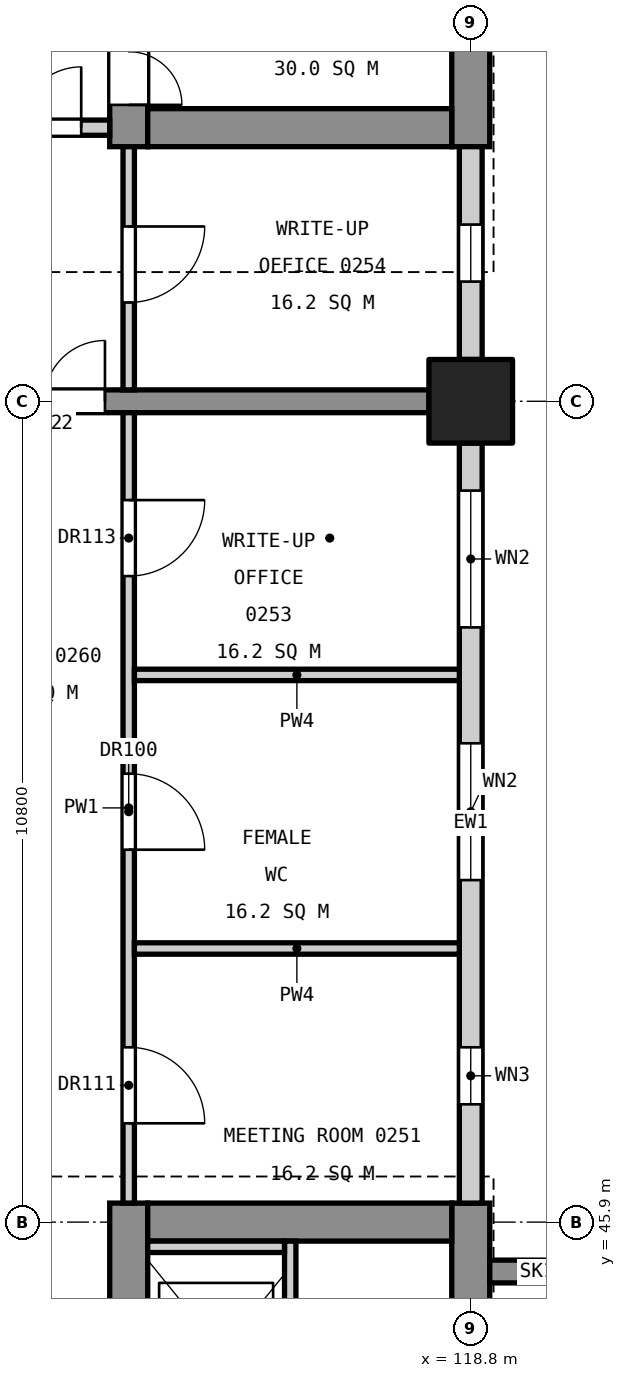
"""IFC4 building model, lengths in metres.
Left out: names, types, materials, properties, quantities, classifications, styles, units other than length and angle.
Written with IfcOpenShell. Run it as: python <this file> out.ifc"""

import sys

from ifc_helpers import new_model, si_unit, direction, frame, frame_2d, origin, origin_2d, place, context, subcontext, project, spatial, rectangle, extrude, element, fill, save


model = new_model("IFC4")
c1 = context("Model", 3, precision=1e-05, world=origin(), true_north=direction((0.0, 1.0)))
c2 = subcontext(c1, "Body", "Model", "MODEL_VIEW")
j1 = project(units=[si_unit("LENGTHUNIT", "METRE"), si_unit("PLANEANGLEUNIT", "RADIAN")], contexts=[c1])
p1 = place(None, origin())
s1 = spatial("IfcSite", under=j1, at=p1, CompositionType="ELEMENT")
p2 = place(p1, origin())
s2 = spatial("IfcBuilding", under=s1, at=p2, CompositionType="ELEMENT")
p3 = place(p2, frame((0.0, 0.0, 11.4)))
s3 = spatial("IfcBuildingStorey", under=s2, at=p3, CompositionType="ELEMENT", Elevation=11.4)
p4 = place(p3, frame((118.8, 56.7, 0.0), z_axis=(0.0, 0.0, 1.0), x_axis=(1.0, 0.0, 0.0)))
e1 = element("IfcColumn", 1, at=p4, inside=s3, PredefinedType="COLUMN", context=c2, shape_type="SweptSolid", body=[
    extrude(rectangle(XDim=1.1, YDim=1.1, at=origin_2d()), origin(), (0.0, 0.0, 1.0), 5.4),
])
p5 = place(p3, frame((118.8, 34.85, 0.0), z_axis=(0.0, 0.0, 1.0), x_axis=(0.0, 1.0, 0.0)))
e2 = element("IfcWall", 2, at=p5, inside=s3, PredefinedType="SHEAR", context=c2, shape_type="SweptSolid", body=[
    extrude(rectangle(XDim=11.3, YDim=0.5, at=frame_2d((5.65, 0.0))), origin(), (0.0, 0.0, 1.0), 5.1),
])
p6 = place(p5, frame((6.3, 0.0, 3.4)))
e3 = element("IfcOpeningElement", 3, at=p6, cuts=e2, PredefinedType="OPENING", context=c2, shape_type="SweptSolid", body=[
    extrude(rectangle(XDim=1.2, YDim=0.9, at=frame_2d((0.6, 0.45))), frame((0.0, 0.26, 0.0), z_axis=(0.0, -1.0, 0.0), x_axis=(1.0, 0.0, 0.0)), (0.0, 0.0, 1.0), 0.52),
])
p7 = place(p3, frame((114.3, 34.85, 0.0), z_axis=(0.0, 0.0, 1.0), x_axis=(0.0, 1.0, 0.0)))
e4 = element("IfcWall", 4, at=p7, inside=s3, PredefinedType="SHEAR", context=c2, shape_type="SweptSolid", body=[
    extrude(rectangle(XDim=11.3, YDim=0.5, at=frame_2d((5.65, 0.0))), origin(), (0.0, 0.0, 1.0), 5.1),
])
p8 = place(p7, frame((0.55, 0.0, 0.0)))
e5 = element("IfcOpeningElement", 5, at=p8, cuts=e4, PredefinedType="OPENING", context=c2, shape_type="SweptSolid", body=[
    extrude(rectangle(XDim=1.4, YDim=2.1, at=frame_2d((0.7, 1.05))), frame((0.0, 0.26, 0.0), z_axis=(0.0, -1.0, 0.0), x_axis=(1.0, 0.0, 0.0)), (0.0, 0.0, 1.0), 0.52),
])
p9 = place(p7, frame((8.8, 0.0, 0.0)))
e6 = element("IfcOpeningElement", 6, at=p9, cuts=e4, PredefinedType="OPENING", context=c2, shape_type="SweptSolid", body=[
    extrude(rectangle(XDim=1.1, YDim=2.1, at=frame_2d((0.55, 1.05))), frame((0.0, 0.26, 0.0), z_axis=(0.0, -1.0, 0.0), x_axis=(1.0, 0.0, 0.0)), (0.0, 0.0, 1.0), 0.52),
])
p10 = place(p3, frame((118.55, 45.9, 0.0), z_axis=(0.0, 0.0, 1.0), x_axis=(-1.0, 0.0, 0.0)))
e7 = element("IfcWall", 7, at=p10, inside=s3, PredefinedType="SHEAR", context=c2, shape_type="SweptSolid", body=[
    extrude(rectangle(XDim=4.0, YDim=0.5, at=frame_2d((2.0, 0.0))), origin(), (0.0, 0.0, 1.0), 5.1),
])
p11 = place(p3, frame((118.8, 60.05, 0.0), z_axis=(0.0, 0.0, 1.0), x_axis=(0.0, 1.0, 0.0)))
e8 = element("IfcWall", 8, at=p11, inside=s3, PredefinedType="SHEAR", context=c2, shape_type="SweptSolid", body=[
    extrude(rectangle(XDim=14.9, YDim=0.5, at=frame_2d((7.45, 0.0))), origin(), (0.0, 0.0, 1.0), 5.1),
])
p12 = place(p11, frame((6.3, 0.0, 3.4)))
e9 = element("IfcOpeningElement", 9, at=p12, cuts=e8, PredefinedType="OPENING", context=c2, shape_type="SweptSolid", body=[
    extrude(rectangle(XDim=1.2, YDim=0.9, at=frame_2d((0.6, 0.45))), frame((0.0, 0.26, 0.0), z_axis=(0.0, -1.0, 0.0), x_axis=(1.0, 0.0, 0.0)), (0.0, 0.0, 1.0), 0.52),
])
p13 = place(p3, frame((114.3, 60.05, 0.0), z_axis=(0.0, 0.0, 1.0), x_axis=(0.0, 1.0, 0.0)))
e10 = element("IfcWall", 10, at=p13, inside=s3, PredefinedType="SHEAR", context=c2, shape_type="SweptSolid", body=[
    extrude(rectangle(XDim=14.9, YDim=0.5, at=frame_2d((7.45, 0.0))), origin(), (0.0, 0.0, 1.0), 5.1),
])
p14 = place(p13, frame((0.55, 0.0, 0.0)))
e11 = element("IfcOpeningElement", 11, at=p14, cuts=e10, PredefinedType="OPENING", context=c2, shape_type="SweptSolid", body=[
    extrude(rectangle(XDim=1.4, YDim=2.1, at=frame_2d((0.7, 1.05))), frame((0.0, 0.26, 0.0), z_axis=(0.0, -1.0, 0.0), x_axis=(1.0, 0.0, 0.0)), (0.0, 0.0, 1.0), 0.52),
])
p15 = place(p13, frame((8.85, 0.0, 0.0)))
e12 = element("IfcOpeningElement", 12, at=p15, cuts=e10, PredefinedType="OPENING", context=c2, shape_type="SweptSolid", body=[
    extrude(rectangle(XDim=1.1, YDim=2.1, at=frame_2d((0.55, 1.05))), frame((0.0, 0.26, 0.0), z_axis=(0.0, -1.0, 0.0), x_axis=(1.0, 0.0, 0.0)), (0.0, 0.0, 1.0), 0.52),
])
p16 = place(p13, frame((11.4, 0.0, 0.0)))
e13 = element("IfcOpeningElement", 13, at=p16, cuts=e10, PredefinedType="OPENING", context=c2, shape_type="SweptSolid", body=[
    extrude(rectangle(XDim=1.1, YDim=2.1, at=frame_2d((0.55, 1.05))), frame((0.0, 0.26, 0.0), z_axis=(0.0, -1.0, 0.0), x_axis=(1.0, 0.0, 0.0)), (0.0, 0.0, 1.0), 0.52),
])
p17 = place(p3, frame((118.55, 60.3, 0.0), z_axis=(0.0, 0.0, 1.0), x_axis=(-1.0, 0.0, 0.0)))
e14 = element("IfcWall", 14, at=p17, inside=s3, PredefinedType="SHEAR", context=c2, shape_type="SweptSolid", body=[
    extrude(rectangle(XDim=4.0, YDim=0.5, at=frame_2d((2.0, 0.0))), origin(), (0.0, 0.0, 1.0), 5.1),
])
p18 = place(p3, frame((119.05, 45.25, 0.0), z_axis=(0.0, 0.0, 1.0), x_axis=(1.0, 0.0, 0.0)))
e15 = element("IfcWall", 15, at=p18, inside=s3, PredefinedType="SHEAR", context=c2, shape_type="SweptSolid", body=[
    extrude(rectangle(XDim=1.25, YDim=0.3, at=frame_2d((0.625, 0.0))), origin(), (0.0, 0.0, 1.0), 5.4),
])
p19 = place(p3, frame((118.25, 56.7, 0.0), z_axis=(0.0, 0.0, 1.0), x_axis=(-1.0, 0.0, 0.0)))
e16 = element("IfcWall", 16, at=p19, inside=s3, PredefinedType="SHEAR", context=c2, shape_type="SweptSolid", body=[
    extrude(rectangle(XDim=6.1, YDim=0.3, at=frame_2d((3.05, 0.0))), origin(), (0.0, 0.0, 1.0), 5.1),
])
p20 = place(p19, frame((4.262, 0.0, 0.0)))
e17 = element("IfcOpeningElement", 17, at=p20, cuts=e16, PredefinedType="OPENING", context=c2, shape_type="SweptSolid", body=[
    extrude(rectangle(XDim=1.6, YDim=2.1, at=frame_2d((0.8, 1.05))), frame((0.0, 0.16, 0.0), z_axis=(0.0, -1.0, 0.0), x_axis=(1.0, 0.0, 0.0)), (0.0, 0.0, 1.0), 0.32),
])
p21 = place(p3, frame((116.425, 43.0, 0.0), z_axis=(0.0, 0.0, 1.0), x_axis=(0.0, 1.0, 0.0)))
e18 = element("IfcWall", 18, at=p21, inside=s3, PredefinedType="SOLIDWALL", context=c2, shape_type="SweptSolid", body=[
    extrude(rectangle(XDim=2.65, YDim=0.15, at=frame_2d((1.325, 0.0))), origin(), (0.0, 0.0, 1.0), 5.4),
])
p22 = place(p3, frame((116.35, 45.575, 0.0), z_axis=(0.0, 0.0, 1.0), x_axis=(-1.0, 0.0, 0.0)))
e19 = element("IfcWall", 19, at=p22, inside=s3, PredefinedType="SOLIDWALL", context=c2, shape_type="SweptSolid", body=[
    extrude(rectangle(XDim=1.8, YDim=0.15, at=frame_2d((0.9, 0.0))), origin(), (0.0, 0.0, 1.0), 5.4),
])
p23 = place(p3, frame((118.8, 46.15, 0.0), z_axis=(0.0, 0.0, 1.0), x_axis=(0.0, 1.0, 0.0)))
e20 = element("IfcWall", 20, at=p23, inside=s3, PredefinedType="STANDARD", context=c2, shape_type="SweptSolid", body=[
    extrude(rectangle(XDim=10.0, YDim=0.3, at=frame_2d((5.0, 0.0))), origin(), (0.0, 0.0, 1.0), 4.1),
])
p24 = place(p23, frame((1.3, 0.0, 0.8)))
e21 = element("IfcOpeningElement", 21, at=p24, cuts=e20, PredefinedType="OPENING", context=c2, shape_type="SweptSolid", body=[
    extrude(rectangle(XDim=0.75, YDim=1.2, at=frame_2d((0.375, 0.6))), frame((0.0, 0.16, 0.0), z_axis=(0.0, -1.0, 0.0), x_axis=(1.0, 0.0, 0.0)), (0.0, 0.0, 1.0), 0.32),
])
p25 = place(p23, frame((4.25, 0.0, 0.9)))
e22 = element("IfcOpeningElement", 22, at=p25, cuts=e20, PredefinedType="OPENING", context=c2, shape_type="SweptSolid", body=[
    extrude(rectangle(XDim=1.8, YDim=3.0, at=frame_2d((0.9, 1.5))), frame((0.0, 0.16, 0.0), z_axis=(0.0, -1.0, 0.0), x_axis=(1.0, 0.0, 0.0)), (0.0, 0.0, 1.0), 0.32),
])
p26 = place(p23, frame((7.575, 0.0, 0.9)))
e23 = element("IfcOpeningElement", 23, at=p26, cuts=e20, PredefinedType="OPENING", context=c2, shape_type="SweptSolid", body=[
    extrude(rectangle(XDim=1.8, YDim=3.0, at=frame_2d((0.9, 1.5))), frame((0.0, 0.16, 0.0), z_axis=(0.0, -1.0, 0.0), x_axis=(1.0, 0.0, 0.0)), (0.0, 0.0, 1.0), 0.32),
])
p27 = place(p3, frame((118.8, 57.25, 0.0), z_axis=(0.0, 0.0, 1.0), x_axis=(0.0, 1.0, 0.0)))
e24 = element("IfcWall", 24, at=p27, inside=s3, PredefinedType="STANDARD", context=c2, shape_type="SweptSolid", body=[
    extrude(rectangle(XDim=2.8, YDim=0.3, at=frame_2d((1.4, 0.0))), origin(), (0.0, 0.0, 1.0), 4.1),
])
p28 = place(p27, frame((1.025, 0.0, 0.8)))
e25 = element("IfcOpeningElement", 25, at=p28, cuts=e24, PredefinedType="OPENING", context=c2, shape_type="SweptSolid", body=[
    extrude(rectangle(XDim=0.75, YDim=1.2, at=frame_2d((0.375, 0.6))), frame((0.0, 0.16, 0.0), z_axis=(0.0, -1.0, 0.0), x_axis=(1.0, 0.0, 0.0)), (0.0, 0.0, 1.0), 0.32),
])
p29 = place(p3, frame((114.3, 46.15, 0.0), z_axis=(0.0, 0.0, 1.0), x_axis=(0.0, 1.0, 0.0)))
e26 = element("IfcWall", 26, at=p29, inside=s3, PredefinedType="PARTITIONING", context=c2, shape_type="SweptSolid", body=[
    extrude(rectangle(XDim=10.4, YDim=0.15, at=frame_2d((5.2, 0.0))), origin(), (0.0, 0.0, 1.0), 4.0),
])
p30 = place(p29, frame((4.65, 0.0, 0.0)))
e27 = element("IfcOpeningElement", 27, at=p30, cuts=e26, PredefinedType="OPENING", context=c2, shape_type="SweptSolid", body=[
    extrude(rectangle(XDim=1.0, YDim=2.1, at=frame_2d((0.5, 1.05))), frame((0.0, 0.085, 0.0), z_axis=(0.0, -1.0, 0.0), x_axis=(1.0, 0.0, 0.0)), (0.0, 0.0, 1.0), 0.17),
])
p31 = place(p29, frame((1.05, 0.0, 0.0)))
e28 = element("IfcOpeningElement", 28, at=p31, cuts=e26, PredefinedType="OPENING", context=c2, shape_type="SweptSolid", body=[
    extrude(rectangle(XDim=1.0, YDim=2.1, at=frame_2d((0.5, 1.05))), frame((0.0, 0.085, 0.0), z_axis=(0.0, -1.0, 0.0), x_axis=(1.0, 0.0, 0.0)), (0.0, 0.0, 1.0), 0.17),
])
p32 = place(p29, frame((8.25, 0.0, 0.0)))
e29 = element("IfcOpeningElement", 29, at=p32, cuts=e26, PredefinedType="OPENING", context=c2, shape_type="SweptSolid", body=[
    extrude(rectangle(XDim=1.0, YDim=2.1, at=frame_2d((0.5, 1.05))), frame((0.0, 0.085, 0.0), z_axis=(0.0, -1.0, 0.0), x_axis=(1.0, 0.0, 0.0)), (0.0, 0.0, 1.0), 0.17),
])
p33 = place(p3, frame((114.3, 56.85, 0.0), z_axis=(0.0, 0.0, 1.0), x_axis=(0.0, 1.0, 0.0)))
e30 = element("IfcWall", 30, at=p33, inside=s3, PredefinedType="PARTITIONING", context=c2, shape_type="SweptSolid", body=[
    extrude(rectangle(XDim=3.2, YDim=0.15, at=frame_2d((1.6, 0.0))), origin(), (0.0, 0.0, 1.0), 4.0),
])
p34 = place(p33, frame((1.15, 0.0, 0.0)))
e31 = element("IfcOpeningElement", 31, at=p34, cuts=e30, PredefinedType="OPENING", context=c2, shape_type="SweptSolid", body=[
    extrude(rectangle(XDim=1.0, YDim=2.1, at=frame_2d((0.5, 1.05))), frame((0.0, 0.085, 0.0), z_axis=(0.0, -1.0, 0.0), x_axis=(1.0, 0.0, 0.0)), (0.0, 0.0, 1.0), 0.17),
])
for number, where, z_axis, x_axis in (
    (32, (118.65, 49.5, 0.0), (0.0, 0.0, 1.0), (-1.0, 0.0, 0.0)),
    (33, (118.65, 53.1, 0.0), (0.0, 0.0, 1.0), (-1.0, 0.0, 0.0)),
):
    element("IfcWall", number, at=place(p3, frame(where, z_axis=z_axis, x_axis=x_axis)), inside=s3, PredefinedType="PARTITIONING", context=c2, shape_type="SweptSolid", body=[
        extrude(rectangle(XDim=4.275, YDim=0.15, at=frame_2d((2.137, 0.0))), origin(), (0.0, 0.0, 1.0), 4.3),
    ])
p35 = place(p3, frame((114.05, 60.3, 0.0), z_axis=(0.0, 0.0, 1.0), x_axis=(-1.0, 0.0, 0.0)))
e34 = element("IfcWall", 34, at=p35, inside=s3, PredefinedType="PARTITIONING", context=c2, shape_type="SweptSolid", body=[
    extrude(rectangle(XDim=2.35, YDim=0.2, at=frame_2d((1.175, 0.0))), origin(), (0.0, 0.0, 1.0), 4.3),
])
p36 = place(p35, frame((0.375, 0.0, 0.0)))
e35 = element("IfcOpeningElement", 35, at=p36, cuts=e34, PredefinedType="OPENING", context=c2, shape_type="SweptSolid", body=[
    extrude(rectangle(XDim=1.6, YDim=2.1, at=frame_2d((0.8, 1.05))), frame((0.0, 0.11, 0.0), z_axis=(0.0, -1.0, 0.0), x_axis=(1.0, 0.0, 0.0)), (0.0, 0.0, 1.0), 0.22),
])
p37 = place(p14, frame((1.4, 0.0, 0.0), z_axis=(0.0, 0.0, 1.0), x_axis=(-1.0, 0.0, 0.0)))
e36 = element("IfcDoor", 36, at=p37, inside=s3, OperationType="DOUBLE_DOOR_SINGLE_SWING", PredefinedType="DOOR", context=c2, shape_type="SweptSolid", body=[
    extrude(rectangle(XDim=1.4, YDim=2.1, at=frame_2d((0.7, 1.05))), frame((0.0, 0.025, 0.0), z_axis=(0.0, -1.0, 0.0), x_axis=(1.0, 0.0, 0.0)), (0.0, 0.0, 1.0), 0.05),
])
fill(e11, e36)
p38 = place(p24, origin())
e37 = element("IfcWindow", 37, at=p38, inside=s3, PartitioningType="SINGLE_PANEL", PredefinedType="WINDOW", context=c2, shape_type="SweptSolid", body=[
    extrude(rectangle(XDim=0.75, YDim=1.2, at=frame_2d((0.375, 0.6))), frame((0.0, 0.03, 0.0), z_axis=(0.0, -1.0, 0.0), x_axis=(1.0, 0.0, 0.0)), (0.0, 0.0, 1.0), 0.06),
])
fill(e21, e37)
p39 = place(p25, origin())
e38 = element("IfcWindow", 38, at=p39, inside=s3, PartitioningType="SINGLE_PANEL", PredefinedType="WINDOW", context=c2, shape_type="SweptSolid", body=[
    extrude(rectangle(XDim=1.8, YDim=3.0, at=frame_2d((0.9, 1.5))), frame((0.0, 0.03, 0.0), z_axis=(0.0, -1.0, 0.0), x_axis=(1.0, 0.0, 0.0)), (0.0, 0.0, 1.0), 0.06),
])
fill(e22, e38)
p40 = place(p26, origin())
e39 = element("IfcWindow", 39, at=p40, inside=s3, PartitioningType="SINGLE_PANEL", PredefinedType="WINDOW", context=c2, shape_type="SweptSolid", body=[
    extrude(rectangle(XDim=1.8, YDim=3.0, at=frame_2d((0.9, 1.5))), frame((0.0, 0.03, 0.0), z_axis=(0.0, -1.0, 0.0), x_axis=(1.0, 0.0, 0.0)), (0.0, 0.0, 1.0), 0.06),
])
fill(e23, e39)
p41 = place(p28, origin())
e40 = element("IfcWindow", 40, at=p41, inside=s3, PartitioningType="SINGLE_PANEL", PredefinedType="WINDOW", context=c2, shape_type="SweptSolid", body=[
    extrude(rectangle(XDim=0.75, YDim=1.2, at=frame_2d((0.375, 0.6))), frame((0.0, 0.03, 0.0), z_axis=(0.0, -1.0, 0.0), x_axis=(1.0, 0.0, 0.0)), (0.0, 0.0, 1.0), 0.06),
])
fill(e25, e40)
p42 = place(p30, frame((1.0, 0.0, 0.0), z_axis=(0.0, 0.0, 1.0), x_axis=(-1.0, 0.0, 0.0)))
e41 = element("IfcDoor", 41, at=p42, inside=s3, OperationType="SINGLE_SWING_RIGHT", PredefinedType="DOOR", context=c2, shape_type="SweptSolid", body=[
    extrude(rectangle(XDim=1.0, YDim=2.1, at=frame_2d((0.5, 1.05))), frame((0.0, 0.025, 0.0), z_axis=(0.0, -1.0, 0.0), x_axis=(1.0, 0.0, 0.0)), (0.0, 0.0, 1.0), 0.05),
])
fill(e27, e41)
p43 = place(p31, frame((1.0, 0.0, 0.0), z_axis=(0.0, 0.0, 1.0), x_axis=(-1.0, 0.0, 0.0)))
e42 = element("IfcDoor", 42, at=p43, inside=s3, OperationType="SINGLE_SWING_RIGHT", PredefinedType="DOOR", context=c2, shape_type="SweptSolid", body=[
    extrude(rectangle(XDim=1.0, YDim=2.1, at=frame_2d((0.5, 1.05))), frame((0.0, 0.025, 0.0), z_axis=(0.0, -1.0, 0.0), x_axis=(1.0, 0.0, 0.0)), (0.0, 0.0, 1.0), 0.05),
])
fill(e28, e42)
p44 = place(p32, frame((1.0, 0.0, 0.0), z_axis=(0.0, 0.0, 1.0), x_axis=(-1.0, 0.0, 0.0)))
e43 = element("IfcDoor", 43, at=p44, inside=s3, OperationType="SINGLE_SWING_LEFT", PredefinedType="DOOR", context=c2, shape_type="SweptSolid", body=[
    extrude(rectangle(XDim=1.0, YDim=2.1, at=frame_2d((0.5, 1.05))), frame((0.0, 0.025, 0.0), z_axis=(0.0, -1.0, 0.0), x_axis=(1.0, 0.0, 0.0)), (0.0, 0.0, 1.0), 0.05),
])
fill(e29, e43)
p45 = place(p34, frame((1.0, 0.0, 0.0), z_axis=(0.0, 0.0, 1.0), x_axis=(-1.0, 0.0, 0.0)))
e44 = element("IfcDoor", 44, at=p45, inside=s3, OperationType="SINGLE_SWING_LEFT", PredefinedType="DOOR", context=c2, shape_type="SweptSolid", body=[
    extrude(rectangle(XDim=1.0, YDim=2.1, at=frame_2d((0.5, 1.05))), frame((0.0, 0.025, 0.0), z_axis=(0.0, -1.0, 0.0), x_axis=(1.0, 0.0, 0.0)), (0.0, 0.0, 1.0), 0.05),
])
fill(e31, e44)
p46 = place(p36, frame((1.6, 0.0, 0.0), z_axis=(0.0, 0.0, 1.0), x_axis=(-1.0, 0.0, 0.0)))
e45 = element("IfcDoor", 45, at=p46, inside=s3, OperationType="DOUBLE_DOOR_SINGLE_SWING", PredefinedType="DOOR", context=c2, shape_type="SweptSolid", body=[
    extrude(rectangle(XDim=1.6, YDim=2.1, at=frame_2d((0.8, 1.05))), frame((0.0, 0.025, 0.0), z_axis=(0.0, -1.0, 0.0), x_axis=(1.0, 0.0, 0.0)), (0.0, 0.0, 1.0), 0.05),
])
fill(e35, e45)
p47 = place(p20, frame((1.6, 0.0, 0.0), z_axis=(0.0, 0.0, 1.0), x_axis=(-1.0, 0.0, 0.0)))
e46 = element("IfcDoor", 46, at=p47, inside=s3, OperationType="DOUBLE_DOOR_SINGLE_SWING", PredefinedType="DOOR", context=c2, shape_type="SweptSolid", body=[
    extrude(rectangle(XDim=1.6, YDim=2.1, at=frame_2d((0.8, 1.05))), frame((0.0, 0.025, 0.0), z_axis=(0.0, -1.0, 0.0), x_axis=(1.0, 0.0, 0.0)), (0.0, 0.0, 1.0), 0.05),
])
fill(e17, e46)
save(model, sys.argv[1])
